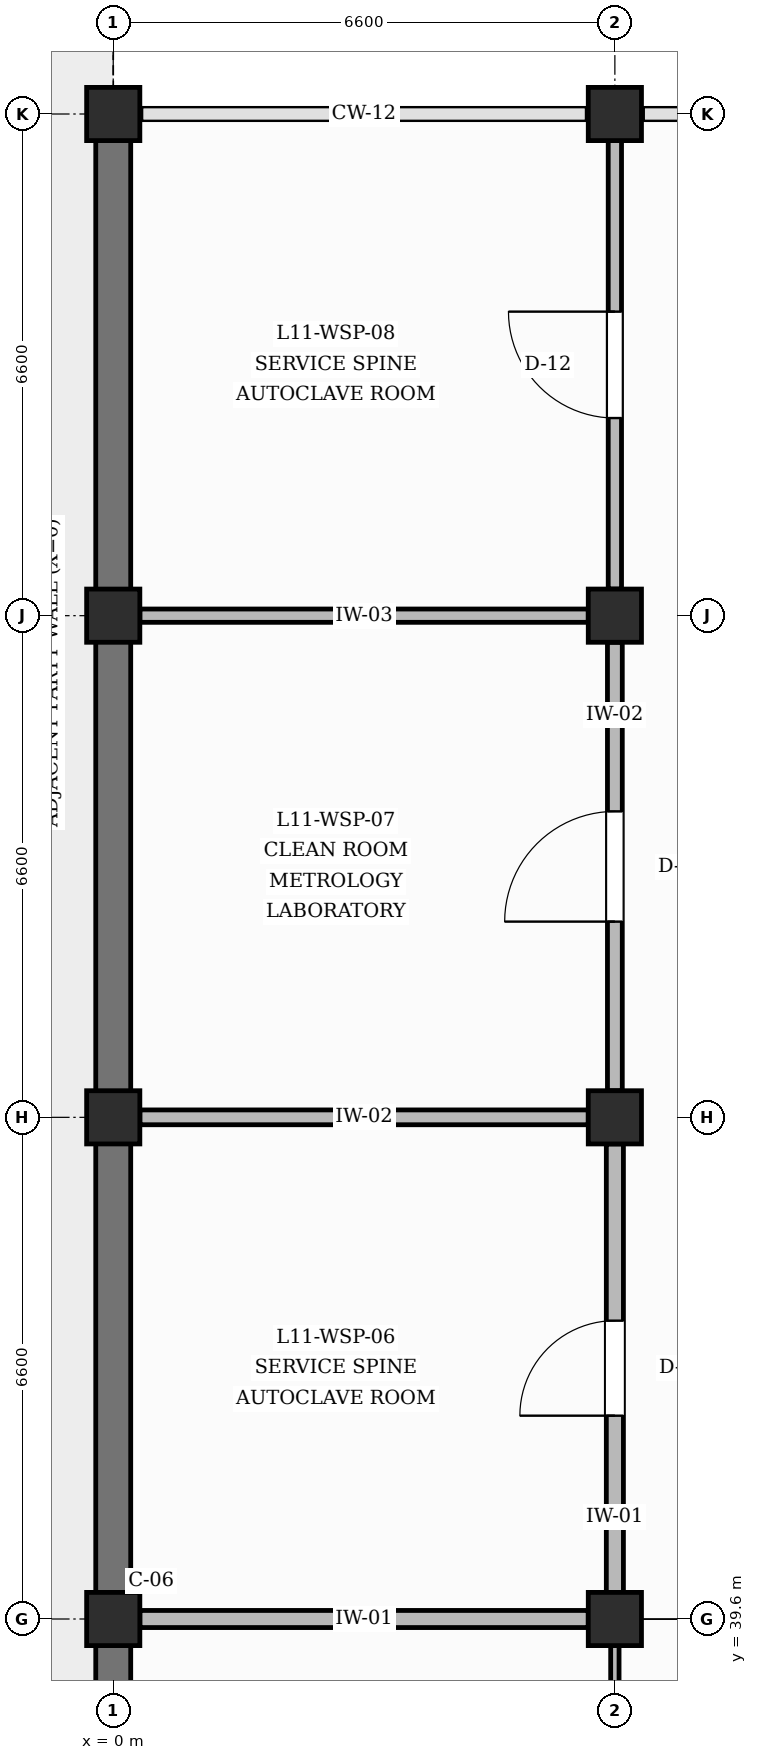
"""IFC4 building model, lengths in metres.
Left out: names, types, materials, properties, quantities, classifications, styles, units other than length and angle.
Written with IfcOpenShell. Run it as: python <this file> out.ifc"""

import sys

from ifc_helpers import new_model, si_unit, direction, frame, frame_2d, origin, origin_2d, place, context, subcontext, project, spatial, rectangle, extrude, element, fill, save


model = new_model("IFC4")
c1 = context("Model", 3, precision=1e-05, world=origin(), true_north=direction((0.0, 1.0)))
c2 = subcontext(c1, "Body", "Model", "MODEL_VIEW")
j1 = project(units=[si_unit("LENGTHUNIT", "METRE"), si_unit("PLANEANGLEUNIT", "RADIAN")], contexts=[c1])
p1 = place(None, origin())
s1 = spatial("IfcSite", under=j1, at=p1, CompositionType="ELEMENT")
p2 = place(p1, origin())
s2 = spatial("IfcBuilding", under=s1, at=p2, CompositionType="ELEMENT")
p3 = place(p2, frame((0.0, 0.0, 48.0)))
s3 = spatial("IfcBuildingStorey", under=s2, at=p3, CompositionType="ELEMENT", Elevation=48.0)
for number, where, z_axis, x_axis in (
    (1, (0.0, 39.6, 0.0), (0.0, 0.0, 1.0), (1.0, 0.0, 0.0)),
    (2, (0.0, 46.2, 0.0), (0.0, 0.0, 1.0), (1.0, 0.0, 0.0)),
    (3, (0.0, 52.8, 0.0), (0.0, 0.0, 1.0), (1.0, 0.0, 0.0)),
    (4, (0.0, 59.4, 0.0), (0.0, 0.0, 1.0), (1.0, 0.0, 0.0)),
    (5, (6.6, 39.6, 0.0), (0.0, 0.0, 1.0), (1.0, 0.0, 0.0)),
    (6, (6.6, 46.2, 0.0), (0.0, 0.0, 1.0), (1.0, 0.0, 0.0)),
    (7, (6.6, 52.8, 0.0), (0.0, 0.0, 1.0), (1.0, 0.0, 0.0)),
    (8, (6.6, 59.4, 0.0), (0.0, 0.0, 1.0), (1.0, 0.0, 0.0)),
):
    element("IfcColumn", number, at=place(p3, frame(where, z_axis=z_axis, x_axis=x_axis)), inside=s3, PredefinedType="COLUMN", context=c2, shape_type="SweptSolid", body=[
        extrude(rectangle(XDim=0.7, YDim=0.7, at=origin_2d()), origin(), (0.0, 0.0, 1.0), 4.2),
    ])
p4 = place(p3, frame((0.0, 33.35, 0.0), z_axis=(0.0, 0.0, 1.0), x_axis=(0.0, 1.0, 0.0)))
e9 = element("IfcWall", 9, at=p4, inside=s3, PredefinedType="SOLIDWALL", context=c2, shape_type="SweptSolid", body=[
    extrude(rectangle(XDim=5.9, YDim=0.46, at=frame_2d((2.95, 0.0))), origin(), (0.0, 0.0, 1.0), 3.29),
])
p5 = place(p3, frame((0.0, 39.95, 0.0), z_axis=(0.0, 0.0, 1.0), x_axis=(0.0, 1.0, 0.0)))
e10 = element("IfcWall", 10, at=p5, inside=s3, PredefinedType="SOLIDWALL", context=c2, shape_type="SweptSolid", body=[
    extrude(rectangle(XDim=5.9, YDim=0.46, at=frame_2d((2.95, 0.0))), origin(), (0.0, 0.0, 1.0), 3.29),
])
p6 = place(p3, frame((0.0, 46.55, 0.0), z_axis=(0.0, 0.0, 1.0), x_axis=(0.0, 1.0, 0.0)))
e11 = element("IfcWall", 11, at=p6, inside=s3, PredefinedType="SOLIDWALL", context=c2, shape_type="SweptSolid", body=[
    extrude(rectangle(XDim=5.9, YDim=0.46, at=frame_2d((2.95, 0.0))), origin(), (0.0, 0.0, 1.0), 3.29),
])
p7 = place(p3, frame((0.0, 53.15, 0.0), z_axis=(0.0, 0.0, 1.0), x_axis=(0.0, 1.0, 0.0)))
e12 = element("IfcWall", 12, at=p7, inside=s3, PredefinedType="SOLIDWALL", context=c2, shape_type="SweptSolid", body=[
    extrude(rectangle(XDim=5.9, YDim=0.46, at=frame_2d((2.95, 0.0))), origin(), (0.0, 0.0, 1.0), 3.29),
])
p8 = place(p3, frame((6.6, 33.35, 0.0), z_axis=(0.0, 0.0, 1.0), x_axis=(0.0, 1.0, 0.0)))
e13 = element("IfcWall", 13, at=p8, inside=s3, PredefinedType="PARTITIONING", context=c2, shape_type="SweptSolid", body=[
    extrude(rectangle(XDim=5.9, YDim=0.11, at=frame_2d((2.95, 0.0))), origin(), (0.0, 0.0, 1.0), 3.29),
])
p9 = place(p8, frame((2.3, 0.0, 0.0)))
e14 = element("IfcOpeningElement", 14, at=p9, cuts=e13, PredefinedType="OPENING", context=c2, shape_type="SweptSolid", body=[
    extrude(rectangle(XDim=1.3, YDim=2.3, at=frame_2d((0.65, 1.15))), frame((0.0, 0.065, 0.0), z_axis=(0.0, -1.0, 0.0), x_axis=(1.0, 0.0, 0.0)), (0.0, 0.0, 1.0), 0.13),
])
p10 = place(p3, frame((0.35, 39.6, 0.0), z_axis=(0.0, 0.0, 1.0), x_axis=(1.0, 0.0, 0.0)))
e15 = element("IfcWall", 15, at=p10, inside=s3, PredefinedType="PARTITIONING", context=c2, shape_type="SweptSolid", body=[
    extrude(rectangle(XDim=5.9, YDim=0.225, at=frame_2d((2.95, 0.0))), origin(), (0.0, 0.0, 1.0), 3.29),
])
p11 = place(p3, frame((6.6, 39.95, 0.0), z_axis=(0.0, 0.0, 1.0), x_axis=(0.0, 1.0, 0.0)))
e16 = element("IfcWall", 16, at=p11, inside=s3, PredefinedType="PARTITIONING", context=c2, shape_type="SweptSolid", body=[
    extrude(rectangle(XDim=5.9, YDim=0.225, at=frame_2d((2.95, 0.0))), origin(), (0.0, 0.0, 1.0), 3.29),
])
p12 = place(p11, frame((2.325, 0.0, 0.0)))
e17 = element("IfcOpeningElement", 17, at=p12, cuts=e16, PredefinedType="OPENING", context=c2, shape_type="SweptSolid", body=[
    extrude(rectangle(XDim=1.25, YDim=2.25, at=frame_2d((0.625, 1.125))), frame((0.0, 0.123, 0.0), z_axis=(0.0, -1.0, 0.0), x_axis=(1.0, 0.0, 0.0)), (0.0, 0.0, 1.0), 0.245),
])
p13 = place(p3, frame((0.35, 46.2, 0.0), z_axis=(0.0, 0.0, 1.0), x_axis=(1.0, 0.0, 0.0)))
e18 = element("IfcWall", 18, at=p13, inside=s3, PredefinedType="PARTITIONING", context=c2, shape_type="SweptSolid", body=[
    extrude(rectangle(XDim=5.9, YDim=0.195, at=frame_2d((2.95, 0.0))), origin(), (0.0, 0.0, 1.0), 3.29),
])
p14 = place(p3, frame((6.6, 46.55, 0.0), z_axis=(0.0, 0.0, 1.0), x_axis=(0.0, 1.0, 0.0)))
e19 = element("IfcWall", 19, at=p14, inside=s3, PredefinedType="PARTITIONING", context=c2, shape_type="SweptSolid", body=[
    extrude(rectangle(XDim=5.9, YDim=0.195, at=frame_2d((2.95, 0.0))), origin(), (0.0, 0.0, 1.0), 3.29),
])
p15 = place(p14, frame((2.225, 0.0, 0.0)))
e20 = element("IfcOpeningElement", 20, at=p15, cuts=e19, PredefinedType="OPENING", context=c2, shape_type="SweptSolid", body=[
    extrude(rectangle(XDim=1.45, YDim=2.25, at=frame_2d((0.725, 1.125))), frame((0.0, 0.107, 0.0), z_axis=(0.0, -1.0, 0.0), x_axis=(1.0, 0.0, 0.0)), (0.0, 0.0, 1.0), 0.215),
])
p16 = place(p3, frame((0.35, 52.8, 0.0), z_axis=(0.0, 0.0, 1.0), x_axis=(1.0, 0.0, 0.0)))
e21 = element("IfcWall", 21, at=p16, inside=s3, PredefinedType="PARTITIONING", context=c2, shape_type="SweptSolid", body=[
    extrude(rectangle(XDim=5.9, YDim=0.175, at=frame_2d((2.95, 0.0))), origin(), (0.0, 0.0, 1.0), 3.29),
])
p17 = place(p3, frame((6.6, 53.15, 0.0), z_axis=(0.0, 0.0, 1.0), x_axis=(0.0, 1.0, 0.0)))
e22 = element("IfcWall", 22, at=p17, inside=s3, PredefinedType="PARTITIONING", context=c2, shape_type="SweptSolid", body=[
    extrude(rectangle(XDim=5.9, YDim=0.175, at=frame_2d((2.95, 0.0))), origin(), (0.0, 0.0, 1.0), 3.29),
])
p18 = place(p17, frame((2.25, 0.0, 0.0)))
e23 = element("IfcOpeningElement", 23, at=p18, cuts=e22, PredefinedType="OPENING", context=c2, shape_type="SweptSolid", body=[
    extrude(rectangle(XDim=1.4, YDim=2.25, at=frame_2d((0.7, 1.125))), frame((0.0, 0.097, 0.0), z_axis=(0.0, -1.0, 0.0), x_axis=(1.0, 0.0, 0.0)), (0.0, 0.0, 1.0), 0.195),
])
p19 = place(p12, origin())
e24 = element("IfcDoor", 24, at=p19, inside=s3, OperationType="SINGLE_SWING_LEFT", PredefinedType="DOOR", context=c2, shape_type="SweptSolid", body=[
    extrude(rectangle(XDim=1.25, YDim=2.25, at=frame_2d((0.625, 1.125))), frame((0.0, 0.025, 0.0), z_axis=(0.0, -1.0, 0.0), x_axis=(1.0, 0.0, 0.0)), (0.0, 0.0, 1.0), 0.05),
])
fill(e17, e24)
p20 = place(p15, origin())
e25 = element("IfcDoor", 25, at=p20, inside=s3, OperationType="SINGLE_SWING_LEFT", PredefinedType="DOOR", context=c2, shape_type="SweptSolid", body=[
    extrude(rectangle(XDim=1.45, YDim=2.25, at=frame_2d((0.725, 1.125))), frame((0.0, 0.025, 0.0), z_axis=(0.0, -1.0, 0.0), x_axis=(1.0, 0.0, 0.0)), (0.0, 0.0, 1.0), 0.05),
])
fill(e20, e25)
p21 = place(p18, origin())
e26 = element("IfcDoor", 26, at=p21, inside=s3, OperationType="SINGLE_SWING_RIGHT", PredefinedType="DOOR", context=c2, shape_type="SweptSolid", body=[
    extrude(rectangle(XDim=1.4, YDim=2.25, at=frame_2d((0.7, 1.125))), frame((0.0, 0.025, 0.0), z_axis=(0.0, -1.0, 0.0), x_axis=(1.0, 0.0, 0.0)), (0.0, 0.0, 1.0), 0.05),
])
fill(e23, e26)
save(model, sys.argv[1])
